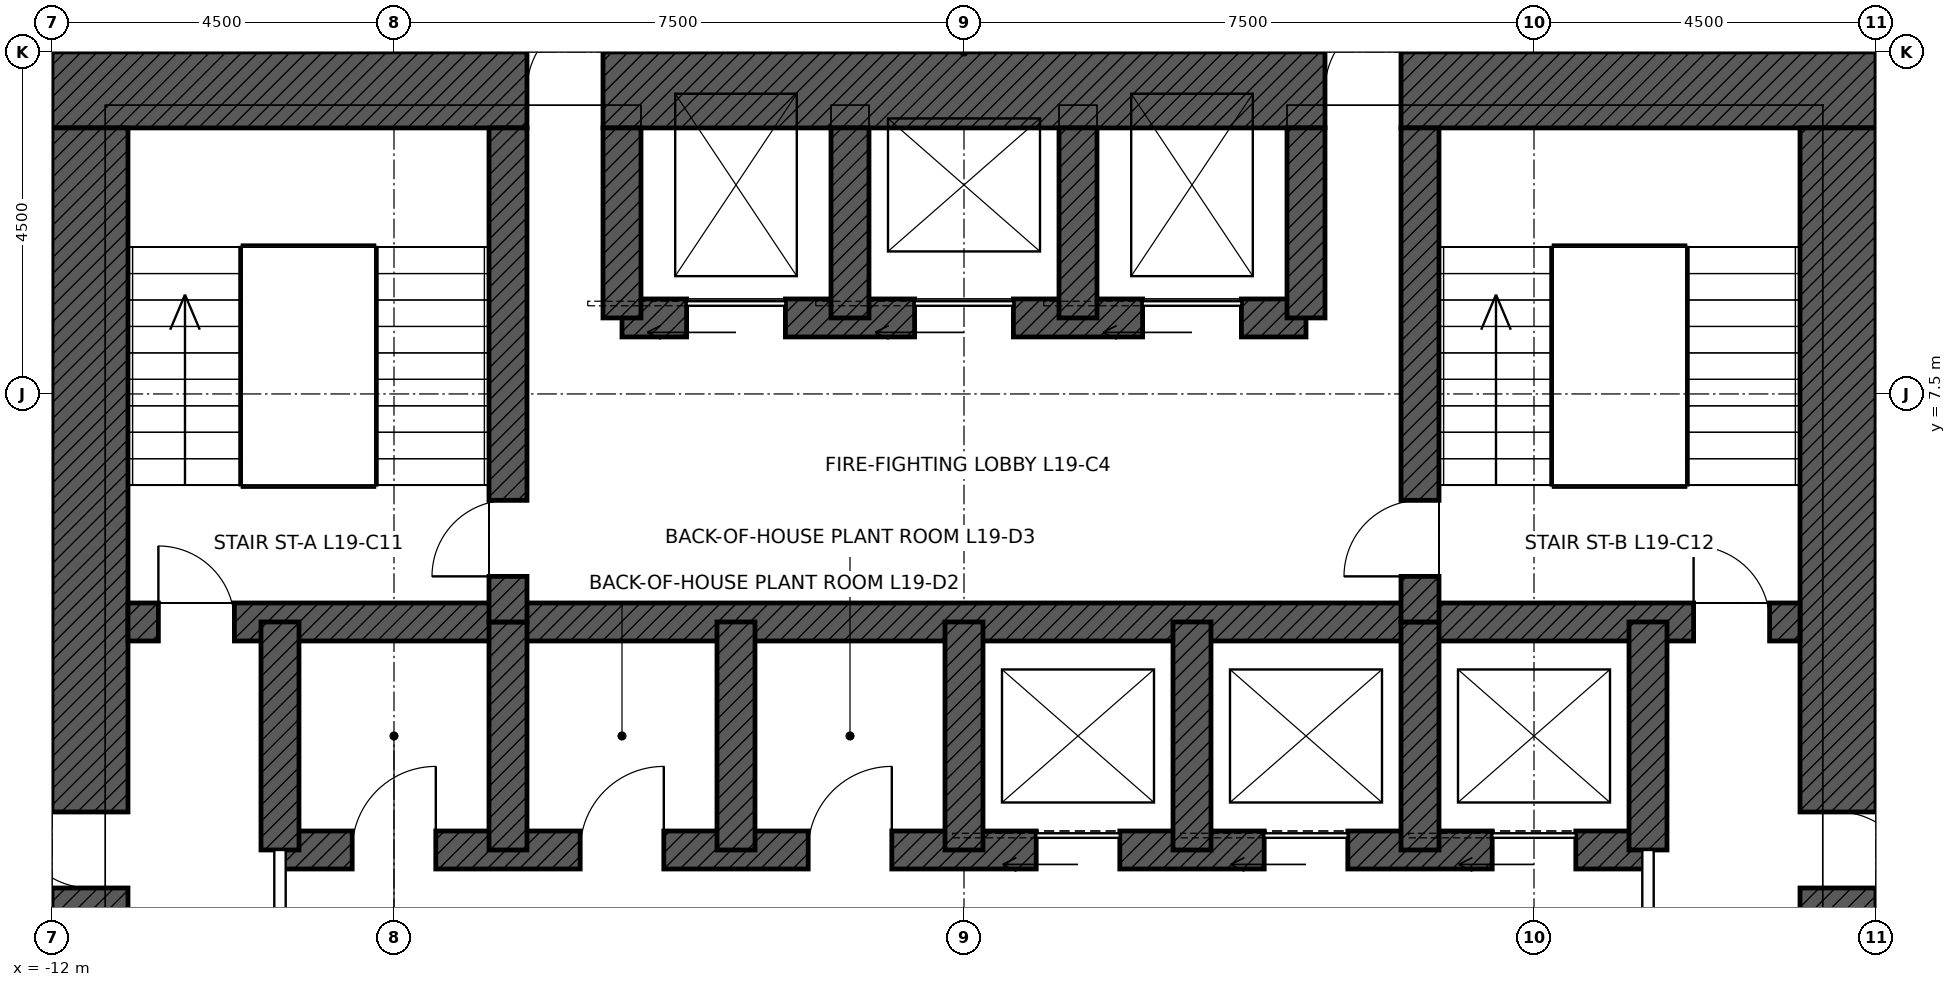
"""IFC4 building model, lengths in metres.
Left out: names, types, materials, properties, quantities, classifications, styles, units other than length and angle.
Written with IfcOpenShell. Run it as: python <this file> out.ifc"""

import sys

from ifc_helpers import new_model, si_unit, direction, frame, frame_2d, origin, place, context, subcontext, project, spatial, rectangle, extrude, element, fill, save


model = new_model("IFC4")
c1 = context("Model", 3, precision=1e-05, world=origin(), true_north=direction((0.0, 1.0)))
c2 = subcontext(c1, "Body", "Model", "MODEL_VIEW")
j1 = project(units=[si_unit("LENGTHUNIT", "METRE"), si_unit("PLANEANGLEUNIT", "RADIAN")], contexts=[c1])
p1 = place(None, origin())
s1 = spatial("IfcSite", under=j1, at=p1, CompositionType="ELEMENT")
p2 = place(p1, origin())
s2 = spatial("IfcBuilding", under=s1, at=p2, CompositionType="ELEMENT")
p3 = place(p2, frame((0.0, 0.0, 98.4)))
s3 = spatial("IfcBuildingStorey", under=s2, at=p3, CompositionType="ELEMENT", Elevation=98.4)
p4 = place(p3, frame((-12.0, 11.5, 0.0), z_axis=(0.0, 0.0, 1.0), x_axis=(1.0, 0.0, 0.0)))
e1 = element("IfcWall", 1, at=p4, inside=s3, PredefinedType="SHEAR", context=c2, shape_type="SweptSolid", body=[
    extrude(rectangle(XDim=24.0, YDim=1.0, at=frame_2d((12.0, 0.0))), origin(), (0.0, 0.0, 1.0), 6.0),
])
p5 = place(p4, frame((6.25, 0.0, 0.0)))
e2 = element("IfcOpeningElement", 2, at=p5, cuts=e1, PredefinedType="OPENING", context=c2, shape_type="SweptSolid", body=[
    extrude(rectangle(XDim=1.0, YDim=2.4, at=frame_2d((0.5, 1.2))), frame((0.0, 0.51, 0.0), z_axis=(0.0, -1.0, 0.0), x_axis=(1.0, 0.0, 0.0)), (0.0, 0.0, 1.0), 1.02),
])
p6 = place(p4, frame((16.75, 0.0, 0.0)))
e3 = element("IfcOpeningElement", 3, at=p6, cuts=e1, PredefinedType="OPENING", context=c2, shape_type="SweptSolid", body=[
    extrude(rectangle(XDim=1.0, YDim=2.4, at=frame_2d((0.5, 1.2))), frame((0.0, 0.51, 0.0), z_axis=(0.0, -1.0, 0.0), x_axis=(1.0, 0.0, 0.0)), (0.0, 0.0, 1.0), 1.02),
])
p7 = place(p3, frame((11.5, 11.0, 0.0), z_axis=(0.0, 0.0, 1.0), x_axis=(0.0, -1.0, 0.0)))
e4 = element("IfcWall", 4, at=p7, inside=s3, PredefinedType="SHEAR", context=c2, shape_type="SweptSolid", body=[
    extrude(rectangle(XDim=22.0, YDim=1.0, at=frame_2d((11.0, 0.0))), origin(), (0.0, 0.0, 1.0), 6.0),
])
p8 = place(p7, frame((9.0, 0.0, 0.0)))
e5 = element("IfcOpeningElement", 5, at=p8, cuts=e4, PredefinedType="OPENING", context=c2, shape_type="SweptSolid", body=[
    extrude(rectangle(XDim=1.0, YDim=2.4, at=frame_2d((0.5, 1.2))), frame((0.0, 0.51, 0.0), z_axis=(0.0, -1.0, 0.0), x_axis=(1.0, 0.0, 0.0)), (0.0, 0.0, 1.0), 1.02),
])
p9 = place(p3, frame((-11.5, -11.0, 0.0), z_axis=(0.0, 0.0, 1.0), x_axis=(0.0, 1.0, 0.0)))
e6 = element("IfcWall", 6, at=p9, inside=s3, PredefinedType="SHEAR", context=c2, shape_type="SweptSolid", body=[
    extrude(rectangle(XDim=22.0, YDim=1.0, at=frame_2d((11.0, 0.0))), origin(), (0.0, 0.0, 1.0), 6.0),
])
p10 = place(p9, frame((12.0, 0.0, 0.0)))
e7 = element("IfcOpeningElement", 7, at=p10, cuts=e6, PredefinedType="OPENING", context=c2, shape_type="SweptSolid", body=[
    extrude(rectangle(XDim=1.0, YDim=2.4, at=frame_2d((0.5, 1.2))), frame((0.0, 0.51, 0.0), z_axis=(0.0, -1.0, 0.0), x_axis=(1.0, 0.0, 0.0)), (0.0, 0.0, 1.0), 1.02),
])
p11 = place(p3, frame((-11.0, 4.5, 0.0), z_axis=(0.0, 0.0, 1.0), x_axis=(1.0, 0.0, 0.0)))
e8 = element("IfcWall", 8, at=p11, inside=s3, PredefinedType="SHEAR", context=c2, shape_type="SweptSolid", body=[
    extrude(rectangle(XDim=22.0, YDim=0.5, at=frame_2d((11.0, 0.0))), origin(), (0.0, 0.0, 1.0), 6.0),
])
p12 = place(p11, frame((0.4, 0.0, 0.0)))
e9 = element("IfcOpeningElement", 9, at=p12, cuts=e8, PredefinedType="OPENING", context=c2, shape_type="SweptSolid", body=[
    extrude(rectangle(XDim=1.0, YDim=2.1, at=frame_2d((0.5, 1.05))), frame((0.0, 0.26, 0.0), z_axis=(0.0, -1.0, 0.0), x_axis=(1.0, 0.0, 0.0)), (0.0, 0.0, 1.0), 0.52),
])
p13 = place(p11, frame((20.6, 0.0, 0.0)))
e10 = element("IfcOpeningElement", 10, at=p13, cuts=e8, PredefinedType="OPENING", context=c2, shape_type="SweptSolid", body=[
    extrude(rectangle(XDim=1.0, YDim=2.1, at=frame_2d((0.5, 1.05))), frame((0.0, 0.26, 0.0), z_axis=(0.0, -1.0, 0.0), x_axis=(1.0, 0.0, 0.0)), (0.0, 0.0, 1.0), 0.52),
])
p14 = place(p3, frame((-9.0, 1.5, 0.0), z_axis=(0.0, 0.0, 1.0), x_axis=(1.0, 0.0, 0.0)))
e11 = element("IfcWall", 11, at=p14, inside=s3, PredefinedType="SHEAR", context=c2, shape_type="SweptSolid", body=[
    extrude(rectangle(XDim=18.0, YDim=0.5, at=frame_2d((9.0, 0.0))), origin(), (0.0, 0.0, 1.0), 6.0),
])
p15 = place(p14, frame((9.95, 0.0, 0.0)))
e12 = element("IfcOpeningElement", 12, at=p15, cuts=e11, PredefinedType="OPENING", context=c2, shape_type="SweptSolid", body=[
    extrude(rectangle(XDim=1.1, YDim=2.1, at=frame_2d((0.55, 1.05))), frame((0.0, 0.26, 0.0), z_axis=(0.0, -1.0, 0.0), x_axis=(1.0, 0.0, 0.0)), (0.0, 0.0, 1.0), 0.52),
])
p16 = place(p14, frame((12.95, 0.0, 0.0)))
e13 = element("IfcOpeningElement", 13, at=p16, cuts=e11, PredefinedType="OPENING", context=c2, shape_type="SweptSolid", body=[
    extrude(rectangle(XDim=1.1, YDim=2.1, at=frame_2d((0.55, 1.05))), frame((0.0, 0.26, 0.0), z_axis=(0.0, -1.0, 0.0), x_axis=(1.0, 0.0, 0.0)), (0.0, 0.0, 1.0), 0.52),
])
p17 = place(p14, frame((15.95, 0.0, 0.0)))
e14 = element("IfcOpeningElement", 14, at=p17, cuts=e11, PredefinedType="OPENING", context=c2, shape_type="SweptSolid", body=[
    extrude(rectangle(XDim=1.1, YDim=2.1, at=frame_2d((0.55, 1.05))), frame((0.0, 0.26, 0.0), z_axis=(0.0, -1.0, 0.0), x_axis=(1.0, 0.0, 0.0)), (0.0, 0.0, 1.0), 0.52),
])
p18 = place(p14, frame((0.95, 0.0, 0.0)))
e15 = element("IfcOpeningElement", 15, at=p18, cuts=e11, PredefinedType="OPENING", context=c2, shape_type="SweptSolid", body=[
    extrude(rectangle(XDim=1.1, YDim=2.1, at=frame_2d((0.55, 1.05))), frame((0.0, 0.26, 0.0), z_axis=(0.0, -1.0, 0.0), x_axis=(1.0, 0.0, 0.0)), (0.0, 0.0, 1.0), 0.52),
])
p19 = place(p14, frame((3.95, 0.0, 0.0)))
e16 = element("IfcOpeningElement", 16, at=p19, cuts=e11, PredefinedType="OPENING", context=c2, shape_type="SweptSolid", body=[
    extrude(rectangle(XDim=1.1, YDim=2.1, at=frame_2d((0.55, 1.05))), frame((0.0, 0.26, 0.0), z_axis=(0.0, -1.0, 0.0), x_axis=(1.0, 0.0, 0.0)), (0.0, 0.0, 1.0), 0.52),
])
p20 = place(p14, frame((6.95, 0.0, 0.0)))
e17 = element("IfcOpeningElement", 17, at=p20, cuts=e11, PredefinedType="OPENING", context=c2, shape_type="SweptSolid", body=[
    extrude(rectangle(XDim=1.1, YDim=2.1, at=frame_2d((0.55, 1.05))), frame((0.0, 0.26, 0.0), z_axis=(0.0, -1.0, 0.0), x_axis=(1.0, 0.0, 0.0)), (0.0, 0.0, 1.0), 0.52),
])
p21 = place(p3, frame((-4.5, 8.5, 0.0), z_axis=(0.0, 0.0, 1.0), x_axis=(1.0, 0.0, 0.0)))
e18 = element("IfcWall", 18, at=p21, inside=s3, PredefinedType="SHEAR", context=c2, shape_type="SweptSolid", body=[
    extrude(rectangle(XDim=9.0, YDim=0.5, at=frame_2d((4.5, 0.0))), origin(), (0.0, 0.0, 1.0), 6.0),
])
p22 = place(p21, frame((0.85, 0.0, 0.0)))
e19 = element("IfcOpeningElement", 19, at=p22, cuts=e18, PredefinedType="OPENING", context=c2, shape_type="SweptSolid", body=[
    extrude(rectangle(XDim=1.3, YDim=2.4, at=frame_2d((0.65, 1.2))), frame((0.0, 0.26, 0.0), z_axis=(0.0, -1.0, 0.0), x_axis=(1.0, 0.0, 0.0)), (0.0, 0.0, 1.0), 0.52),
])
p23 = place(p21, frame((6.85, 0.0, 0.0)))
e20 = element("IfcOpeningElement", 20, at=p23, cuts=e18, PredefinedType="OPENING", context=c2, shape_type="SweptSolid", body=[
    extrude(rectangle(XDim=1.3, YDim=2.4, at=frame_2d((0.65, 1.2))), frame((0.0, 0.26, 0.0), z_axis=(0.0, -1.0, 0.0), x_axis=(1.0, 0.0, 0.0)), (0.0, 0.0, 1.0), 0.52),
])
p24 = place(p21, frame((3.85, 0.0, 0.0)))
e21 = element("IfcOpeningElement", 21, at=p24, cuts=e18, PredefinedType="OPENING", context=c2, shape_type="SweptSolid", body=[
    extrude(rectangle(XDim=1.3, YDim=2.4, at=frame_2d((0.65, 1.2))), frame((0.0, 0.26, 0.0), z_axis=(0.0, -1.0, 0.0), x_axis=(1.0, 0.0, 0.0)), (0.0, 0.0, 1.0), 0.52),
])
for number, where, z_axis, x_axis in (
    (22, (-9.0, 1.5, 0.0), (0.0, 0.0, 1.0), (0.0, 1.0, 0.0)),
    (23, (9.0, 1.5, 0.0), (0.0, 0.0, 1.0), (0.0, 1.0, 0.0)),
    (24, (-6.0, 1.5, 0.0), (0.0, 0.0, 1.0), (0.0, 1.0, 0.0)),
    (25, (-3.0, 1.5, 0.0), (0.0, 0.0, 1.0), (0.0, 1.0, 0.0)),
    (26, (0.0, 1.5, 0.0), (0.0, 0.0, 1.0), (0.0, 1.0, 0.0)),
    (27, (3.0, 1.5, 0.0), (0.0, 0.0, 1.0), (0.0, 1.0, 0.0)),
    (28, (6.0, 1.5, 0.0), (0.0, 0.0, 1.0), (0.0, 1.0, 0.0)),
):
    element("IfcWall", number, at=place(p3, frame(where, z_axis=z_axis, x_axis=x_axis)), inside=s3, PredefinedType="SHEAR", context=c2, shape_type="SweptSolid", body=[
        extrude(rectangle(XDim=3.0, YDim=0.5, at=frame_2d((1.5, 0.0))), origin(), (0.0, 0.0, 1.0), 6.0),
    ])
p25 = place(p3, frame((-6.0, 4.5, 0.0), z_axis=(0.0, 0.0, 1.0), x_axis=(0.0, 1.0, 0.0)))
e29 = element("IfcWall", 29, at=p25, inside=s3, PredefinedType="SHEAR", context=c2, shape_type="SweptSolid", body=[
    extrude(rectangle(XDim=6.5, YDim=0.5, at=frame_2d((3.25, 0.0))), origin(), (0.0, 0.0, 1.0), 6.0),
])
p26 = place(p25, frame((0.6, 0.0, 0.0)))
e30 = element("IfcOpeningElement", 30, at=p26, cuts=e29, PredefinedType="OPENING", context=c2, shape_type="SweptSolid", body=[
    extrude(rectangle(XDim=1.0, YDim=2.1, at=frame_2d((0.5, 1.05))), frame((0.0, 0.26, 0.0), z_axis=(0.0, -1.0, 0.0), x_axis=(1.0, 0.0, 0.0)), (0.0, 0.0, 1.0), 0.52),
])
p27 = place(p3, frame((6.0, 4.5, 0.0), z_axis=(0.0, 0.0, 1.0), x_axis=(0.0, 1.0, 0.0)))
e31 = element("IfcWall", 31, at=p27, inside=s3, PredefinedType="SHEAR", context=c2, shape_type="SweptSolid", body=[
    extrude(rectangle(XDim=6.5, YDim=0.5, at=frame_2d((3.25, 0.0))), origin(), (0.0, 0.0, 1.0), 6.0),
])
p28 = place(p27, frame((0.6, 0.0, 0.0)))
e32 = element("IfcOpeningElement", 32, at=p28, cuts=e31, PredefinedType="OPENING", context=c2, shape_type="SweptSolid", body=[
    extrude(rectangle(XDim=1.0, YDim=2.1, at=frame_2d((0.5, 1.05))), frame((0.0, 0.26, 0.0), z_axis=(0.0, -1.0, 0.0), x_axis=(1.0, 0.0, 0.0)), (0.0, 0.0, 1.0), 0.52),
])
for number, where, z_axis, x_axis in (
    (33, (-4.5, 8.5, 0.0), (0.0, 0.0, 1.0), (0.0, 1.0, 0.0)),
    (34, (4.5, 8.5, 0.0), (0.0, 0.0, 1.0), (0.0, 1.0, 0.0)),
    (35, (-1.5, 8.5, 0.0), (0.0, 0.0, 1.0), (0.0, 1.0, 0.0)),
    (36, (1.5, 8.5, 0.0), (0.0, 0.0, 1.0), (0.0, 1.0, 0.0)),
):
    element("IfcWall", number, at=place(p3, frame(where, z_axis=z_axis, x_axis=x_axis)), inside=s3, PredefinedType="SHEAR", context=c2, shape_type="SweptSolid", body=[
        extrude(rectangle(XDim=2.5, YDim=0.5, at=frame_2d((1.25, 0.0))), origin(), (0.0, 0.0, 1.0), 6.0),
    ])
for number, where, z_axis, x_axis in (
    (37, (-7.5, 12.0, 0.0), (0.0, 0.0, 1.0), (0.0, 1.0, 0.0)),
    (38, (7.5, 12.0, 0.0), (0.0, 0.0, 1.0), (0.0, 1.0, 0.0)),
):
    element("IfcWall", number, at=place(p3, frame(where, z_axis=z_axis, x_axis=x_axis)), inside=s3, PredefinedType="PARTITIONING", context=c2, shape_type="SweptSolid", body=[
        extrude(rectangle(XDim=10.39, YDim=0.15, at=frame_2d((5.195, 0.0))), origin(), (0.0, 0.0, 1.0), 5.8),
    ])
p29 = place(p3, frame((-9.0, -1.5, 0.0), z_axis=(0.0, 0.0, 1.0), x_axis=(0.0, 1.0, 0.0)))
e39 = element("IfcWall", 39, at=p29, inside=s3, PredefinedType="PARTITIONING", context=c2, shape_type="SweptSolid", body=[
    extrude(rectangle(XDim=3.0, YDim=0.15, at=frame_2d((1.5, 0.0))), origin(), (0.0, 0.0, 1.0), 5.75),
])
p30 = place(p29, frame((1.0, 0.0, 0.0)))
e40 = element("IfcOpeningElement", 40, at=p30, cuts=e39, PredefinedType="OPENING", context=c2, shape_type="SweptSolid", body=[
    extrude(rectangle(XDim=1.0, YDim=2.4, at=frame_2d((0.5, 1.2))), frame((0.0, 0.085, 0.0), z_axis=(0.0, -1.0, 0.0), x_axis=(1.0, 0.0, 0.0)), (0.0, 0.0, 1.0), 0.17),
])
p31 = place(p3, frame((9.0, -1.5, 0.0), z_axis=(0.0, 0.0, 1.0), x_axis=(0.0, 1.0, 0.0)))
e41 = element("IfcWall", 41, at=p31, inside=s3, PredefinedType="PARTITIONING", context=c2, shape_type="SweptSolid", body=[
    extrude(rectangle(XDim=3.0, YDim=0.15, at=frame_2d((1.5, 0.0))), origin(), (0.0, 0.0, 1.0), 5.75),
])
p32 = place(p31, frame((1.0, 0.0, 0.0)))
e42 = element("IfcOpeningElement", 42, at=p32, cuts=e41, PredefinedType="OPENING", context=c2, shape_type="SweptSolid", body=[
    extrude(rectangle(XDim=1.0, YDim=2.4, at=frame_2d((0.5, 1.2))), frame((0.0, 0.085, 0.0), z_axis=(0.0, -1.0, 0.0), x_axis=(1.0, 0.0, 0.0)), (0.0, 0.0, 1.0), 0.17),
])
p33 = place(p12, origin())
e43 = element("IfcDoor", 43, at=p33, inside=s3, OperationType="SINGLE_SWING_LEFT", PredefinedType="DOOR", context=c2, shape_type="SweptSolid", body=[
    extrude(rectangle(XDim=1.0, YDim=2.1, at=frame_2d((0.5, 1.05))), frame((0.0, 0.025, 0.0), z_axis=(0.0, -1.0, 0.0), x_axis=(1.0, 0.0, 0.0)), (0.0, 0.0, 1.0), 0.05),
])
fill(e9, e43)
p34 = place(p13, origin())
e44 = element("IfcDoor", 44, at=p34, inside=s3, OperationType="SINGLE_SWING_LEFT", PredefinedType="DOOR", context=c2, shape_type="SweptSolid", body=[
    extrude(rectangle(XDim=1.0, YDim=2.1, at=frame_2d((0.5, 1.05))), frame((0.0, 0.025, 0.0), z_axis=(0.0, -1.0, 0.0), x_axis=(1.0, 0.0, 0.0)), (0.0, 0.0, 1.0), 0.05),
])
fill(e10, e44)
p35 = place(p26, origin())
e45 = element("IfcDoor", 45, at=p35, inside=s3, OperationType="SINGLE_SWING_LEFT", PredefinedType="DOOR", context=c2, shape_type="SweptSolid", body=[
    extrude(rectangle(XDim=1.0, YDim=2.1, at=frame_2d((0.5, 1.05))), frame((0.0, 0.025, 0.0), z_axis=(0.0, -1.0, 0.0), x_axis=(1.0, 0.0, 0.0)), (0.0, 0.0, 1.0), 0.05),
])
fill(e30, e45)
p36 = place(p28, origin())
e46 = element("IfcDoor", 46, at=p36, inside=s3, OperationType="SINGLE_SWING_LEFT", PredefinedType="DOOR", context=c2, shape_type="SweptSolid", body=[
    extrude(rectangle(XDim=1.0, YDim=2.1, at=frame_2d((0.5, 1.05))), frame((0.0, 0.025, 0.0), z_axis=(0.0, -1.0, 0.0), x_axis=(1.0, 0.0, 0.0)), (0.0, 0.0, 1.0), 0.05),
])
fill(e32, e46)
p37 = place(p5, origin())
e47 = element("IfcDoor", 47, at=p37, inside=s3, OperationType="SINGLE_SWING_RIGHT", PredefinedType="DOOR", context=c2, shape_type="SweptSolid", body=[
    extrude(rectangle(XDim=1.0, YDim=2.4, at=frame_2d((0.5, 1.2))), frame((0.0, 0.485, 0.0), z_axis=(0.0, -1.0, 0.0), x_axis=(1.0, 0.0, 0.0)), (0.0, 0.0, 1.0), 0.05),
])
fill(e2, e47)
p38 = place(p6, origin())
e48 = element("IfcDoor", 48, at=p38, inside=s3, OperationType="SINGLE_SWING_RIGHT", PredefinedType="DOOR", context=c2, shape_type="SweptSolid", body=[
    extrude(rectangle(XDim=1.0, YDim=2.4, at=frame_2d((0.5, 1.2))), frame((0.0, 0.485, 0.0), z_axis=(0.0, -1.0, 0.0), x_axis=(1.0, 0.0, 0.0)), (0.0, 0.0, 1.0), 0.05),
])
fill(e3, e48)
p39 = place(p8, origin())
e49 = element("IfcDoor", 49, at=p39, inside=s3, OperationType="SINGLE_SWING_RIGHT", PredefinedType="DOOR", context=c2, shape_type="SweptSolid", body=[
    extrude(rectangle(XDim=1.0, YDim=2.4, at=frame_2d((0.5, 1.2))), frame((0.0, 0.485, 0.0), z_axis=(0.0, -1.0, 0.0), x_axis=(1.0, 0.0, 0.0)), (0.0, 0.0, 1.0), 0.05),
])
fill(e5, e49)
p40 = place(p10, origin())
e50 = element("IfcDoor", 50, at=p40, inside=s3, OperationType="SINGLE_SWING_RIGHT", PredefinedType="DOOR", context=c2, shape_type="SweptSolid", body=[
    extrude(rectangle(XDim=1.0, YDim=2.4, at=frame_2d((0.5, 1.2))), frame((0.0, 0.485, 0.0), z_axis=(0.0, -1.0, 0.0), x_axis=(1.0, 0.0, 0.0)), (0.0, 0.0, 1.0), 0.05),
])
fill(e7, e50)
p41 = place(p22, origin())
e51 = element("IfcDoor", 51, at=p41, inside=s3, OperationType="SLIDING_TO_LEFT", PredefinedType="DOOR", context=c2, shape_type="SweptSolid", body=[
    extrude(rectangle(XDim=1.3, YDim=2.4, at=frame_2d((0.65, 1.2))), frame((0.0, 0.025, 0.0), z_axis=(0.0, -1.0, 0.0), x_axis=(1.0, 0.0, 0.0)), (0.0, 0.0, 1.0), 0.05),
])
fill(e19, e51)
p42 = place(p23, origin())
e52 = element("IfcDoor", 52, at=p42, inside=s3, OperationType="SLIDING_TO_LEFT", PredefinedType="DOOR", context=c2, shape_type="SweptSolid", body=[
    extrude(rectangle(XDim=1.3, YDim=2.4, at=frame_2d((0.65, 1.2))), frame((0.0, 0.025, 0.0), z_axis=(0.0, -1.0, 0.0), x_axis=(1.0, 0.0, 0.0)), (0.0, 0.0, 1.0), 0.05),
])
fill(e20, e52)
p43 = place(p24, origin())
e53 = element("IfcDoor", 53, at=p43, inside=s3, OperationType="SLIDING_TO_LEFT", PredefinedType="DOOR", context=c2, shape_type="SweptSolid", body=[
    extrude(rectangle(XDim=1.3, YDim=2.4, at=frame_2d((0.65, 1.2))), frame((0.0, 0.025, 0.0), z_axis=(0.0, -1.0, 0.0), x_axis=(1.0, 0.0, 0.0)), (0.0, 0.0, 1.0), 0.05),
])
fill(e21, e53)
p44 = place(p15, origin())
e54 = element("IfcDoor", 54, at=p44, inside=s3, OperationType="SLIDING_TO_LEFT", PredefinedType="DOOR", context=c2, shape_type="SweptSolid", body=[
    extrude(rectangle(XDim=1.1, YDim=2.1, at=frame_2d((0.55, 1.05))), frame((0.0, 0.025, 0.0), z_axis=(0.0, -1.0, 0.0), x_axis=(1.0, 0.0, 0.0)), (0.0, 0.0, 1.0), 0.05),
])
fill(e12, e54)
p45 = place(p16, origin())
e55 = element("IfcDoor", 55, at=p45, inside=s3, OperationType="SLIDING_TO_LEFT", PredefinedType="DOOR", context=c2, shape_type="SweptSolid", body=[
    extrude(rectangle(XDim=1.1, YDim=2.1, at=frame_2d((0.55, 1.05))), frame((0.0, 0.025, 0.0), z_axis=(0.0, -1.0, 0.0), x_axis=(1.0, 0.0, 0.0)), (0.0, 0.0, 1.0), 0.05),
])
fill(e13, e55)
p46 = place(p17, origin())
e56 = element("IfcDoor", 56, at=p46, inside=s3, OperationType="SLIDING_TO_LEFT", PredefinedType="DOOR", context=c2, shape_type="SweptSolid", body=[
    extrude(rectangle(XDim=1.1, YDim=2.1, at=frame_2d((0.55, 1.05))), frame((0.0, 0.025, 0.0), z_axis=(0.0, -1.0, 0.0), x_axis=(1.0, 0.0, 0.0)), (0.0, 0.0, 1.0), 0.05),
])
fill(e14, e56)
p47 = place(p18, origin())
e57 = element("IfcDoor", 57, at=p47, inside=s3, OperationType="SINGLE_SWING_RIGHT", PredefinedType="DOOR", context=c2, shape_type="SweptSolid", body=[
    extrude(rectangle(XDim=1.1, YDim=2.1, at=frame_2d((0.55, 1.05))), frame((0.0, 0.025, 0.0), z_axis=(0.0, -1.0, 0.0), x_axis=(1.0, 0.0, 0.0)), (0.0, 0.0, 1.0), 0.05),
])
fill(e15, e57)
p48 = place(p19, origin())
e58 = element("IfcDoor", 58, at=p48, inside=s3, OperationType="SINGLE_SWING_RIGHT", PredefinedType="DOOR", context=c2, shape_type="SweptSolid", body=[
    extrude(rectangle(XDim=1.1, YDim=2.1, at=frame_2d((0.55, 1.05))), frame((0.0, 0.025, 0.0), z_axis=(0.0, -1.0, 0.0), x_axis=(1.0, 0.0, 0.0)), (0.0, 0.0, 1.0), 0.05),
])
fill(e16, e58)
p49 = place(p20, origin())
e59 = element("IfcDoor", 59, at=p49, inside=s3, OperationType="SINGLE_SWING_RIGHT", PredefinedType="DOOR", context=c2, shape_type="SweptSolid", body=[
    extrude(rectangle(XDim=1.1, YDim=2.1, at=frame_2d((0.55, 1.05))), frame((0.0, 0.025, 0.0), z_axis=(0.0, -1.0, 0.0), x_axis=(1.0, 0.0, 0.0)), (0.0, 0.0, 1.0), 0.05),
])
fill(e17, e59)
save(model, sys.argv[1])
